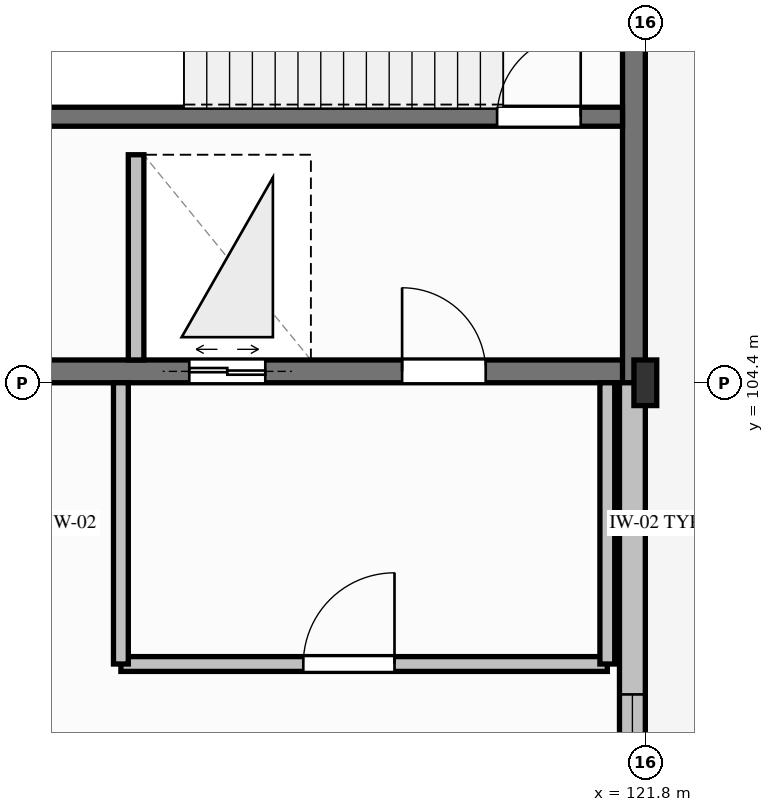
"""IFC4 building model, lengths in metres.
Left out: names, types, materials, properties, quantities, classifications, styles, units other than length and angle.
Written with IfcOpenShell. Run it as: python <this file> out.ifc"""

import sys

from ifc_helpers import new_model, si_unit, direction, frame, frame_2d, origin, origin_2d, place, context, subcontext, project, spatial, rectangle, i_section, extrude, element, fill, save


model = new_model("IFC4")
c1 = context("Model", 3, precision=1e-05, world=origin(), true_north=direction((0.0, 1.0)))
c2 = subcontext(c1, "Body", "Model", "MODEL_VIEW")
j1 = project(units=[si_unit("LENGTHUNIT", "METRE"), si_unit("PLANEANGLEUNIT", "RADIAN")], contexts=[c1])
p1 = place(None, origin())
s1 = spatial("IfcSite", under=j1, at=p1, CompositionType="ELEMENT")
p2 = place(p1, origin())
s2 = spatial("IfcBuilding", under=s1, at=p2, CompositionType="ELEMENT")
p3 = place(p2, origin())
s3 = spatial("IfcBuildingStorey", under=s2, at=p3, CompositionType="ELEMENT", Elevation=0.0)
p4 = place(p3, frame((113.4, 104.55, 0.0), z_axis=(0.0, 0.0, 1.0), x_axis=(1.0, 0.0, 0.0)))
e1 = element("IfcWall", 1, at=p4, inside=s3, PredefinedType="SHEAR", context=c2, shape_type="SweptSolid", body=[
    extrude(rectangle(XDim=8.4, YDim=0.3, at=frame_2d((4.2, 0.0))), origin(), (0.0, 0.0, 1.0), 4.5),
])
p5 = place(p4, frame((5.2, 0.0, 0.0)))
e2 = element("IfcOpeningElement", 2, at=p5, cuts=e1, PredefinedType="OPENING", context=c2, shape_type="SweptSolid", body=[
    extrude(rectangle(XDim=1.1, YDim=2.15, at=frame_2d((0.55, 1.075))), frame((0.0, 0.16, 0.0), z_axis=(0.0, -1.0, 0.0), x_axis=(1.0, 0.0, 0.0)), (0.0, 0.0, 1.0), 0.32),
])
p6 = place(p4, frame((2.4, 0.0, 0.0)))
e3 = element("IfcOpeningElement", 3, at=p6, cuts=e1, PredefinedType="OPENING", context=c2, shape_type="SweptSolid", body=[
    extrude(rectangle(XDim=1.0, YDim=2.1, at=frame_2d((0.5, 1.05))), frame((0.0, 0.16, 0.0), z_axis=(0.0, -1.0, 0.0), x_axis=(1.0, 0.0, 0.0)), (0.0, 0.0, 1.0), 0.32),
])
p7 = place(p3, frame((121.65, 111.6, 0.0), z_axis=(0.0, 0.0, 1.0), x_axis=(0.0, -1.0, 0.0)))
e4 = element("IfcWall", 4, at=p7, inside=s3, PredefinedType="SHEAR", context=c2, shape_type="SweptSolid", body=[
    extrude(rectangle(XDim=7.2, YDim=0.3, at=frame_2d((3.6, 0.0))), origin(), (0.0, 0.0, 1.0), 4.5),
])
p8 = place(p7, frame((0.65, 0.0, 0.0)))
e5 = element("IfcOpeningElement", 5, at=p8, cuts=e4, PredefinedType="OPENING", context=c2, shape_type="SweptSolid", body=[
    extrude(rectangle(XDim=1.3, YDim=2.25, at=frame_2d((0.65, 1.125))), frame((0.0, 0.16, 0.0), z_axis=(0.0, -1.0, 0.0), x_axis=(1.0, 0.0, 0.0)), (0.0, 0.0, 1.0), 0.32),
])
p9 = place(p3, frame((113.7, 107.9, 0.0), z_axis=(0.0, 0.0, 1.0), x_axis=(1.0, 0.0, 0.0)))
e6 = element("IfcWall", 6, at=p9, inside=s3, PredefinedType="SHEAR", context=c2, shape_type="SweptSolid", body=[
    extrude(rectangle(XDim=7.8, YDim=0.25, at=frame_2d((3.9, 0.0))), origin(), (0.0, 0.0, 1.0), 4.5),
])
p10 = place(p9, frame((6.15, 0.0, 0.0)))
e7 = element("IfcOpeningElement", 7, at=p10, cuts=e6, PredefinedType="OPENING", context=c2, shape_type="SweptSolid", body=[
    extrude(rectangle(XDim=1.1, YDim=2.15, at=frame_2d((0.55, 1.075))), frame((0.0, 0.135, 0.0), z_axis=(0.0, -1.0, 0.0), x_axis=(1.0, 0.0, 0.0)), (0.0, 0.0, 1.0), 0.27),
])
p11 = place(p3, frame((121.8, 104.4, 0.0), z_axis=(0.0, 0.0, 1.0), x_axis=(1.0, 0.0, 0.0)))
e8 = element("IfcColumn", 8, at=p11, inside=s3, PredefinedType="COLUMN", context=c2, shape_type="SweptSolid", body=[
    extrude(i_section(OverallWidth=0.3, OverallDepth=0.6, WebThickness=0.015, FlangeThickness=0.03, FilletRadius=0.027, at=origin_2d()), origin(), (0.0, 0.0, 1.0), 4.5),
])
p12 = place(p3, frame((121.63, 104.4, 0.0), z_axis=(0.0, 0.0, 1.0), x_axis=(0.0, -1.0, 0.0)))
e9 = element("IfcWall", 9, at=p12, inside=s3, PredefinedType="SOLIDWALL", context=c2, shape_type="SweptSolid", body=[
    extrude(rectangle(XDim=14.4, YDim=0.34, at=frame_2d((7.2, 0.0))), origin(), (0.0, 0.0, 1.0), 3.728),
])
p13 = place(p12, frame((4.1, 0.0, 0.85)))
e10 = element("IfcOpeningElement", 10, at=p13, cuts=e9, PredefinedType="OPENING", context=c2, shape_type="SweptSolid", body=[
    extrude(rectangle(XDim=1.4, YDim=1.65, at=frame_2d((0.7, 0.825))), frame((0.0, 0.18, 0.0), z_axis=(0.0, -1.0, 0.0), x_axis=(1.0, 0.0, 0.0)), (0.0, 0.0, 1.0), 0.36),
])
p14 = place(p12, frame((8.75, 0.0, 0.85)))
e11 = element("IfcOpeningElement", 11, at=p14, cuts=e9, PredefinedType="OPENING", context=c2, shape_type="SweptSolid", body=[
    extrude(rectangle(XDim=1.7, YDim=1.75, at=frame_2d((0.85, 0.875))), frame((0.0, 0.18, 0.0), z_axis=(0.0, -1.0, 0.0), x_axis=(1.0, 0.0, 0.0)), (0.0, 0.0, 1.0), 0.36),
])
p15 = place(p3, frame((115.1, 104.7, 0.0), z_axis=(0.0, 0.0, 1.0), x_axis=(0.0, 1.0, 0.0)))
e12 = element("IfcWall", 12, at=p15, inside=s3, PredefinedType="PARTITIONING", context=c2, shape_type="SweptSolid", body=[
    extrude(rectangle(XDim=2.7, YDim=0.205, at=frame_2d((1.35, 0.0))), origin(), (0.0, 0.0, 1.0), 3.958),
])
p16 = place(p3, frame((114.9, 100.7, 0.0), z_axis=(0.0, 0.0, 1.0), x_axis=(1.0, 0.0, 0.0)))
e13 = element("IfcWall", 13, at=p16, inside=s3, PredefinedType="PARTITIONING", context=c2, shape_type="SweptSolid", body=[
    extrude(rectangle(XDim=6.4, YDim=0.195, at=frame_2d((3.2, 0.0))), origin(), (0.0, 0.0, 1.0), 4.23),
])
p17 = place(p16, frame((2.4, 0.0, 0.0)))
e14 = element("IfcOpeningElement", 14, at=p17, cuts=e13, PredefinedType="OPENING", context=c2, shape_type="SweptSolid", body=[
    extrude(rectangle(XDim=1.2, YDim=2.15, at=frame_2d((0.6, 1.075))), frame((0.0, 0.107, 0.0), z_axis=(0.0, -1.0, 0.0), x_axis=(1.0, 0.0, 0.0)), (0.0, 0.0, 1.0), 0.215),
])
for number, where, z_axis, x_axis in (
    (15, (121.3, 100.7, 0.0), (0.0, 0.0, 1.0), (0.0, 1.0, 0.0)),
    (16, (114.9, 100.7, 0.0), (0.0, 0.0, 1.0), (0.0, 1.0, 0.0)),
):
    element("IfcWall", number, at=place(p3, frame(where, z_axis=z_axis, x_axis=x_axis)), inside=s3, PredefinedType="PARTITIONING", context=c2, shape_type="SweptSolid", body=[
        extrude(rectangle(XDim=3.7, YDim=0.195, at=frame_2d((1.85, 0.0))), origin(), (0.0, 0.0, 1.0), 3.958),
    ])
p18 = place(p13, origin())
e17 = element("IfcWindow", 17, at=p18, inside=s3, PartitioningType="SINGLE_PANEL", PredefinedType="WINDOW", context=c2, shape_type="SweptSolid", body=[
    extrude(rectangle(XDim=1.4, YDim=1.65, at=frame_2d((0.7, 0.825))), frame((0.0, 0.03, 0.0), z_axis=(0.0, -1.0, 0.0), x_axis=(1.0, 0.0, 0.0)), (0.0, 0.0, 1.0), 0.06),
])
fill(e10, e17)
p19 = place(p10, origin())
e18 = element("IfcDoor", 18, at=p19, inside=s3, OperationType="SINGLE_SWING_RIGHT", PredefinedType="DOOR", context=c2, shape_type="SweptSolid", body=[
    extrude(rectangle(XDim=1.1, YDim=2.15, at=frame_2d((0.55, 1.075))), frame((0.0, 0.025, 0.0), z_axis=(0.0, -1.0, 0.0), x_axis=(1.0, 0.0, 0.0)), (0.0, 0.0, 1.0), 0.05),
])
fill(e7, e18)
p20 = place(p5, origin())
e19 = element("IfcDoor", 19, at=p20, inside=s3, OperationType="SINGLE_SWING_LEFT", PredefinedType="DOOR", context=c2, shape_type="SweptSolid", body=[
    extrude(rectangle(XDim=1.1, YDim=2.15, at=frame_2d((0.55, 1.075))), frame((0.0, 0.025, 0.0), z_axis=(0.0, -1.0, 0.0), x_axis=(1.0, 0.0, 0.0)), (0.0, 0.0, 1.0), 0.05),
])
fill(e2, e19)
p21 = place(p6, origin())
e20 = element("IfcDoor", 20, at=p21, inside=s3, OperationType="DOUBLE_DOOR_SLIDING", PredefinedType="DOOR", context=c2, shape_type="SweptSolid", body=[
    extrude(rectangle(XDim=1.0, YDim=2.1, at=frame_2d((0.5, 1.05))), frame((0.0, 0.025, 0.0), z_axis=(0.0, -1.0, 0.0), x_axis=(1.0, 0.0, 0.0)), (0.0, 0.0, 1.0), 0.05),
])
fill(e3, e20)
p22 = place(p17, origin())
e21 = element("IfcDoor", 21, at=p22, inside=s3, OperationType="SINGLE_SWING_RIGHT", PredefinedType="DOOR", context=c2, shape_type="SweptSolid", body=[
    extrude(rectangle(XDim=1.2, YDim=2.15, at=frame_2d((0.6, 1.075))), frame((0.0, 0.025, 0.0), z_axis=(0.0, -1.0, 0.0), x_axis=(1.0, 0.0, 0.0)), (0.0, 0.0, 1.0), 0.05),
])
fill(e14, e21)
save(model, sys.argv[1])
